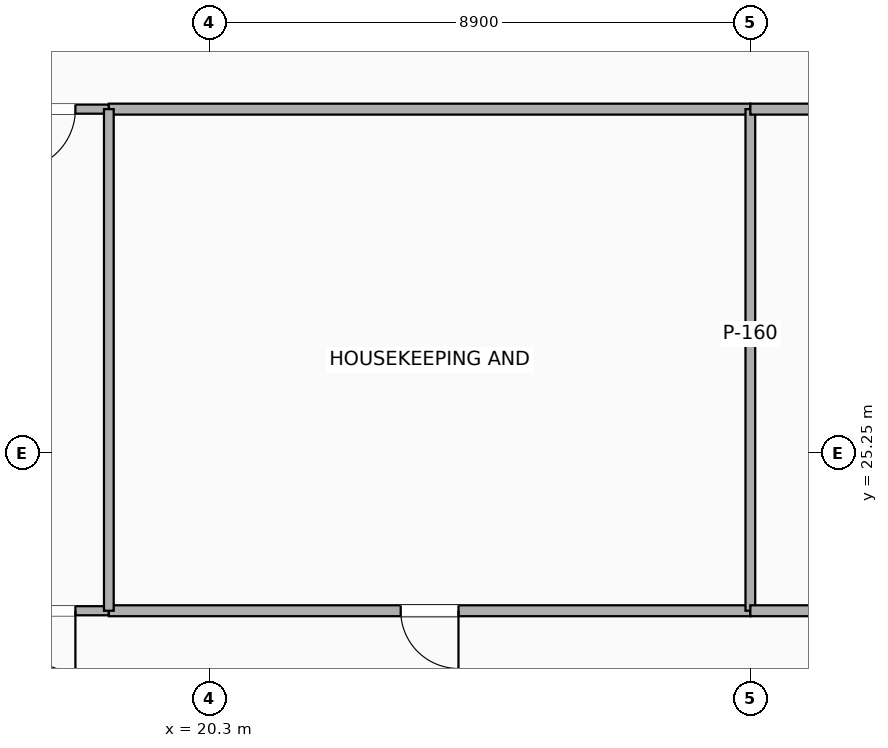
"""IFC4 building model, lengths in metres.
Left out: names, types, materials, properties, quantities, classifications, styles, units other than length and angle.
Written with IfcOpenShell. Run it as: python <this file> out.ifc"""

import sys

from ifc_helpers import new_model, si_unit, direction, frame, frame_2d, origin, place, context, subcontext, project, spatial, rectangle, extrude, element, fill, save


model = new_model("IFC4")
c1 = context("Model", 3, precision=1e-05, world=origin(), true_north=direction((0.0, 1.0)))
c2 = subcontext(c1, "Body", "Model", "MODEL_VIEW")
j1 = project(units=[si_unit("LENGTHUNIT", "METRE"), si_unit("PLANEANGLEUNIT", "RADIAN")], contexts=[c1])
p1 = place(None, origin())
s1 = spatial("IfcSite", under=j1, at=p1, CompositionType="ELEMENT")
p2 = place(p1, origin())
s2 = spatial("IfcBuilding", under=s1, at=p2, CompositionType="ELEMENT")
p3 = place(p2, frame((0.0, 0.0, 50.9)))
s3 = spatial("IfcBuildingStorey", under=s2, at=p3, CompositionType="ELEMENT", Elevation=50.9)
p4 = place(p3, frame((16.65, 22.65, 0.0), z_axis=(0.0, 0.0, 1.0), x_axis=(1.0, 0.0, 0.0)))
e1 = element("IfcWall", 1, at=p4, inside=s3, PredefinedType="PARTITIONING", context=c2, shape_type="SweptSolid", body=[
    extrude(rectangle(XDim=2.0, YDim=0.15, at=frame_2d((1.0, 0.0))), origin(), (0.0, 0.0, 1.0), 3.22),
])
p5 = place(p4, frame((0.45, 0.0, 0.0)))
e2 = element("IfcOpeningElement", 2, at=p5, cuts=e1, PredefinedType="OPENING", context=c2, shape_type="SweptSolid", body=[
    extrude(rectangle(XDim=1.0, YDim=2.15, at=frame_2d((0.5, 1.075))), frame((0.0, 0.085, 0.0), z_axis=(0.0, -1.0, 0.0), x_axis=(1.0, 0.0, 0.0)), (0.0, 0.0, 1.0), 0.17),
])
p6 = place(p3, frame((16.65, 30.9, 0.0), z_axis=(0.0, 0.0, 1.0), x_axis=(1.0, 0.0, 0.0)))
e3 = element("IfcWall", 3, at=p6, inside=s3, PredefinedType="PARTITIONING", context=c2, shape_type="SweptSolid", body=[
    extrude(rectangle(XDim=2.0, YDim=0.15, at=frame_2d((1.0, 0.0))), origin(), (0.0, 0.0, 1.0), 3.22),
])
p7 = place(p6, frame((0.45, 0.0, 0.0)))
e4 = element("IfcOpeningElement", 4, at=p7, cuts=e3, PredefinedType="OPENING", context=c2, shape_type="SweptSolid", body=[
    extrude(rectangle(XDim=1.0, YDim=2.15, at=frame_2d((0.5, 1.075))), frame((0.0, 0.085, 0.0), z_axis=(0.0, -1.0, 0.0), x_axis=(1.0, 0.0, 0.0)), (0.0, 0.0, 1.0), 0.17),
])
p8 = place(p3, frame((18.65, 22.65, 0.0), z_axis=(0.0, 0.0, 1.0), x_axis=(1.0, 0.0, 0.0)))
e5 = element("IfcWall", 5, at=p8, inside=s3, PredefinedType="PARTITIONING", context=c2, shape_type="SweptSolid", body=[
    extrude(rectangle(XDim=10.55, YDim=0.18, at=frame_2d((5.275, 0.0))), origin(), (0.0, 0.0, 1.0), 2.51),
])
p9 = place(p8, frame((4.8, 0.0, 0.0)))
e6 = element("IfcOpeningElement", 6, at=p9, cuts=e5, PredefinedType="OPENING", context=c2, shape_type="SweptSolid", body=[
    extrude(rectangle(XDim=0.95, YDim=2.15, at=frame_2d((0.475, 1.075))), frame((0.0, 0.1, 0.0), z_axis=(0.0, -1.0, 0.0), x_axis=(1.0, 0.0, 0.0)), (0.0, 0.0, 1.0), 0.2),
])
p10 = place(p3, frame((18.65, 30.9, 0.0), z_axis=(0.0, 0.0, 1.0), x_axis=(1.0, 0.0, 0.0)))
e7 = element("IfcWall", 7, at=p10, inside=s3, PredefinedType="PARTITIONING", context=c2, shape_type="SweptSolid", body=[
    extrude(rectangle(XDim=10.55, YDim=0.18, at=frame_2d((5.275, 0.0))), origin(), (0.0, 0.0, 1.0), 2.51),
])
p11 = place(p3, frame((18.65, 22.65, 0.0), z_axis=(0.0, 0.0, 1.0), x_axis=(0.0, 1.0, 0.0)))
e8 = element("IfcWall", 8, at=p11, inside=s3, PredefinedType="PARTITIONING", context=c2, shape_type="SweptSolid", body=[
    extrude(rectangle(XDim=8.25, YDim=0.16, at=frame_2d((4.125, 0.0))), origin(), (0.0, 0.0, 1.0), 2.788),
])
p12 = place(p3, frame((29.2, 22.65, 0.0), z_axis=(0.0, 0.0, 1.0), x_axis=(0.0, 1.0, 0.0)))
e9 = element("IfcWall", 9, at=p12, inside=s3, PredefinedType="PARTITIONING", context=c2, shape_type="SweptSolid", body=[
    extrude(rectangle(XDim=8.25, YDim=0.16, at=frame_2d((4.125, 0.0))), origin(), (0.0, 0.0, 1.0), 2.51),
])
p13 = place(p3, frame((29.2, 22.65, 0.0), z_axis=(0.0, 0.0, 1.0), x_axis=(1.0, 0.0, 0.0)))
e10 = element("IfcWall", 10, at=p13, inside=s3, PredefinedType="PARTITIONING", context=c2, shape_type="SweptSolid", body=[
    extrude(rectangle(XDim=3.9, YDim=0.18, at=frame_2d((1.95, 0.0))), origin(), (0.0, 0.0, 1.0), 2.51),
])
p14 = place(p13, frame((1.475, 0.0, 0.0)))
e11 = element("IfcOpeningElement", 11, at=p14, cuts=e10, PredefinedType="OPENING", context=c2, shape_type="SweptSolid", body=[
    extrude(rectangle(XDim=0.95, YDim=2.15, at=frame_2d((0.475, 1.075))), frame((0.0, 0.1, 0.0), z_axis=(0.0, -1.0, 0.0), x_axis=(1.0, 0.0, 0.0)), (0.0, 0.0, 1.0), 0.2),
])
p15 = place(p3, frame((29.2, 30.9, 0.0), z_axis=(0.0, 0.0, 1.0), x_axis=(1.0, 0.0, 0.0)))
e12 = element("IfcWall", 12, at=p15, inside=s3, PredefinedType="PARTITIONING", context=c2, shape_type="SweptSolid", body=[
    extrude(rectangle(XDim=3.9, YDim=0.18, at=frame_2d((1.95, 0.0))), origin(), (0.0, 0.0, 1.0), 2.51),
])
p16 = place(p5, origin())
e13 = element("IfcDoor", 13, at=p16, inside=s3, OperationType="SINGLE_SWING_RIGHT", PredefinedType="DOOR", context=c2, shape_type="SweptSolid", body=[
    extrude(rectangle(XDim=1.0, YDim=2.15, at=frame_2d((0.5, 1.075))), frame((0.0, 0.025, 0.0), z_axis=(0.0, -1.0, 0.0), x_axis=(1.0, 0.0, 0.0)), (0.0, 0.0, 1.0), 0.05),
])
fill(e2, e13)
p17 = place(p7, origin())
e14 = element("IfcDoor", 14, at=p17, inside=s3, OperationType="SINGLE_SWING_LEFT", PredefinedType="DOOR", context=c2, shape_type="SweptSolid", body=[
    extrude(rectangle(XDim=1.0, YDim=2.15, at=frame_2d((0.5, 1.075))), frame((0.0, 0.025, 0.0), z_axis=(0.0, -1.0, 0.0), x_axis=(1.0, 0.0, 0.0)), (0.0, 0.0, 1.0), 0.05),
])
fill(e4, e14)
p18 = place(p9, origin())
e15 = element("IfcDoor", 15, at=p18, inside=s3, OperationType="SINGLE_SWING_RIGHT", PredefinedType="DOOR", context=c2, shape_type="SweptSolid", body=[
    extrude(rectangle(XDim=0.95, YDim=2.15, at=frame_2d((0.475, 1.075))), frame((0.0, 0.025, 0.0), z_axis=(0.0, -1.0, 0.0), x_axis=(1.0, 0.0, 0.0)), (0.0, 0.0, 1.0), 0.05),
])
fill(e6, e15)
save(model, sys.argv[1])
